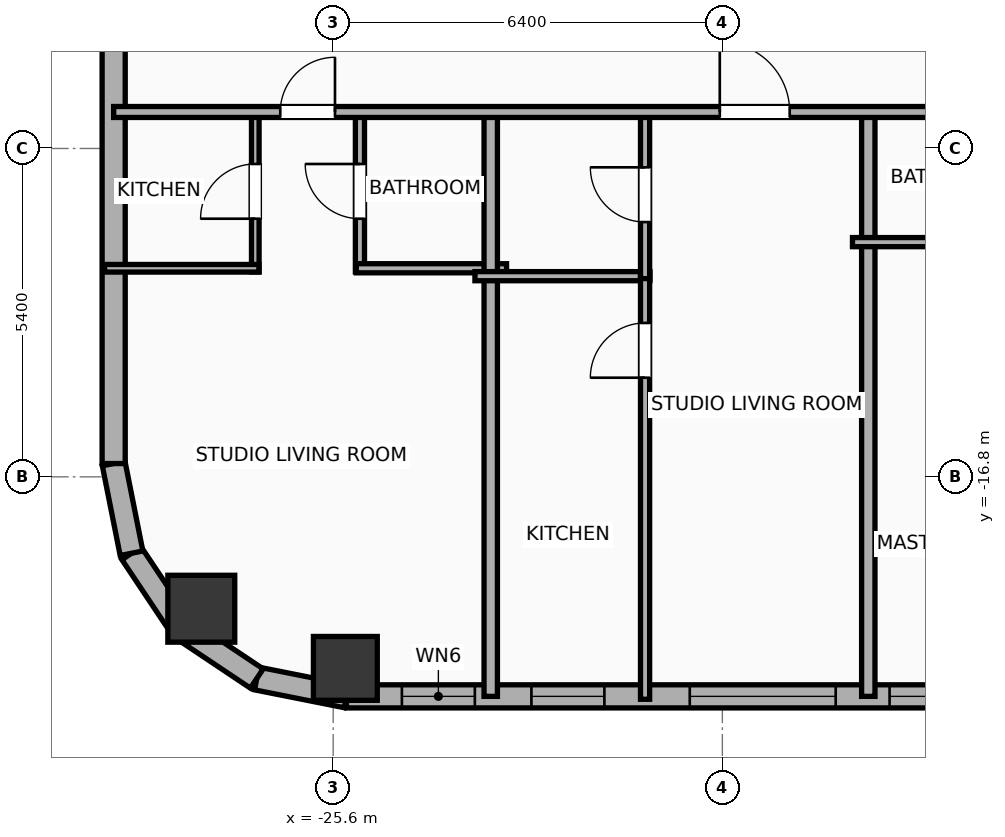
"""IFC4 building model, lengths in metres.
Left out: names, types, materials, properties, quantities, classifications, styles, units other than length and angle.
Written with IfcOpenShell. Run it as: python <this file> out.ifc"""

import sys

from ifc_helpers import new_model, si_unit, direction, frame, frame_2d, origin, origin_2d, place, context, subcontext, project, spatial, rectangle, hollow_rectangle, hollow_circle, extrude, element, fill, save


model = new_model("IFC4")
c1 = context("Model", 3, precision=1e-05, world=origin(), true_north=direction((0.0, 1.0)))
c2 = subcontext(c1, "Body", "Model", "MODEL_VIEW")
j1 = project(units=[si_unit("LENGTHUNIT", "METRE"), si_unit("PLANEANGLEUNIT", "RADIAN")], contexts=[c1])
p1 = place(None, origin())
s1 = spatial("IfcSite", under=j1, at=p1, CompositionType="ELEMENT")
p2 = place(p1, origin())
s2 = spatial("IfcBuilding", under=s1, at=p2, CompositionType="ELEMENT")
p3 = place(p2, frame((0.0, 0.0, 109.2)))
s3 = spatial("IfcBuildingStorey", under=s2, at=p3, CompositionType="ELEMENT", Elevation=109.2)
p4 = place(p3, frame((-25.4, -19.95, 0.0), z_axis=(0.0, 0.0, 1.0), x_axis=(1.0, 0.0, 0.0)))
e1 = element("IfcColumn", 1, at=p4, inside=s3, PredefinedType="COLUMN", context=c2, shape_type="SweptSolid", body=[
    extrude(hollow_rectangle(XDim=1.05, YDim=1.05, WallThickness=0.036, at=origin_2d()), origin(), (0.0, 0.0, 1.0), 3.9),
])
p5 = place(p3, frame((-27.769, -18.969, 0.0), z_axis=(0.0, 0.0, 1.0), x_axis=(1.0, 0.0, 0.0)))
e2 = element("IfcColumn", 2, at=p5, inside=s3, PredefinedType="COLUMN", context=c2, shape_type="SweptSolid", body=[
    extrude(hollow_circle(Radius=0.55, WallThickness=0.036, at=origin_2d()), origin(), (0.0, 0.0, 1.0), 3.9),
])
p6 = place(p3, frame((29.381, -20.41, 0.0), z_axis=(0.0, 0.0, 1.0), x_axis=(-1.0, 0.0, 0.0)))
e3 = element("IfcWall", 3, at=p6, inside=s3, PredefinedType="ELEMENTEDWALL", context=c2, shape_type="SweptSolid", body=[
    extrude(rectangle(XDim=54.763, YDim=0.38, at=frame_2d((27.381, 0.0))), origin(), (0.0, 0.0, 1.0), 3.65),
])
p7 = place(p6, frame((3.995, 0.0, 0.75)))
e4 = element("IfcOpeningElement", 4, at=p7, cuts=e3, PredefinedType="OPENING", context=c2, shape_type="SweptSolid", body=[
    extrude(rectangle(XDim=2.4, YDim=2.1, at=frame_2d((1.2, 1.05))), frame((0.0, 0.2, 0.0), z_axis=(0.0, -1.0, 0.0), x_axis=(1.0, 0.0, 0.0)), (0.0, 0.0, 1.0), 0.4),
])
p8 = place(p6, frame((18.486, 0.0, 0.75)))
e5 = element("IfcOpeningElement", 5, at=p8, cuts=e3, PredefinedType="OPENING", context=c2, shape_type="SweptSolid", body=[
    extrude(rectangle(XDim=2.4, YDim=2.1, at=frame_2d((1.2, 1.05))), frame((0.0, 0.2, 0.0), z_axis=(0.0, -1.0, 0.0), x_axis=(1.0, 0.0, 0.0)), (0.0, 0.0, 1.0), 0.4),
])
p9 = place(p6, frame((46.717, 0.0, 0.75)))
e6 = element("IfcOpeningElement", 6, at=p9, cuts=e3, PredefinedType="OPENING", context=c2, shape_type="SweptSolid", body=[
    extrude(rectangle(XDim=2.4, YDim=2.1, at=frame_2d((1.2, 1.05))), frame((0.0, 0.2, 0.0), z_axis=(0.0, -1.0, 0.0), x_axis=(1.0, 0.0, 0.0)), (0.0, 0.0, 1.0), 0.4),
])
p10 = place(p6, frame((52.651, 0.0, 0.75)))
e7 = element("IfcOpeningElement", 7, at=p10, cuts=e3, PredefinedType="OPENING", context=c2, shape_type="SweptSolid", body=[
    extrude(rectangle(XDim=1.2, YDim=2.05, at=frame_2d((0.6, 1.025))), frame((0.0, 0.2, 0.0), z_axis=(0.0, -1.0, 0.0), x_axis=(1.0, 0.0, 0.0)), (0.0, 0.0, 1.0), 0.4),
])
p11 = place(p6, frame((50.521, 0.0, 0.75)))
e8 = element("IfcOpeningElement", 8, at=p11, cuts=e3, PredefinedType="OPENING", context=c2, shape_type="SweptSolid", body=[
    extrude(rectangle(XDim=1.2, YDim=2.05, at=frame_2d((0.6, 1.025))), frame((0.0, 0.2, 0.0), z_axis=(0.0, -1.0, 0.0), x_axis=(1.0, 0.0, 0.0)), (0.0, 0.0, 1.0), 0.4),
])
p12 = place(p6, frame((40.191, 0.0, 0.75)))
e9 = element("IfcOpeningElement", 9, at=p12, cuts=e3, PredefinedType="OPENING", context=c2, shape_type="SweptSolid", body=[
    extrude(rectangle(XDim=1.2, YDim=2.05, at=frame_2d((0.6, 1.025))), frame((0.0, 0.2, 0.0), z_axis=(0.0, -1.0, 0.0), x_axis=(1.0, 0.0, 0.0)), (0.0, 0.0, 1.0), 0.4),
])
p13 = place(p6, frame((44.631, 0.0, 0.75)))
e10 = element("IfcOpeningElement", 10, at=p13, cuts=e3, PredefinedType="OPENING", context=c2, shape_type="SweptSolid", body=[
    extrude(rectangle(XDim=1.2, YDim=2.05, at=frame_2d((0.6, 1.025))), frame((0.0, 0.2, 0.0), z_axis=(0.0, -1.0, 0.0), x_axis=(1.0, 0.0, 0.0)), (0.0, 0.0, 1.0), 0.4),
])
p14 = place(p6, frame((36.561, 0.0, 0.75)))
e11 = element("IfcOpeningElement", 11, at=p14, cuts=e3, PredefinedType="OPENING", context=c2, shape_type="SweptSolid", body=[
    extrude(rectangle(XDim=1.2, YDim=2.05, at=frame_2d((0.6, 1.025))), frame((0.0, 0.2, 0.0), z_axis=(0.0, -1.0, 0.0), x_axis=(1.0, 0.0, 0.0)), (0.0, 0.0, 1.0), 0.4),
])
p15 = place(p6, frame((30.004, 0.0, 0.75)))
e12 = element("IfcOpeningElement", 12, at=p15, cuts=e3, PredefinedType="OPENING", context=c2, shape_type="SweptSolid", body=[
    extrude(rectangle(XDim=1.2, YDim=2.05, at=frame_2d((0.6, 1.025))), frame((0.0, 0.2, 0.0), z_axis=(0.0, -1.0, 0.0), x_axis=(1.0, 0.0, 0.0)), (0.0, 0.0, 1.0), 0.4),
])
p16 = place(p6, frame((33.599, 0.0, 0.75)))
e13 = element("IfcOpeningElement", 13, at=p16, cuts=e3, PredefinedType="OPENING", context=c2, shape_type="SweptSolid", body=[
    extrude(rectangle(XDim=1.2, YDim=2.05, at=frame_2d((0.6, 1.025))), frame((0.0, 0.2, 0.0), z_axis=(0.0, -1.0, 0.0), x_axis=(1.0, 0.0, 0.0)), (0.0, 0.0, 1.0), 0.4),
])
p17 = place(p6, frame((26.086, 0.0, 0.75)))
e14 = element("IfcOpeningElement", 14, at=p17, cuts=e3, PredefinedType="OPENING", context=c2, shape_type="SweptSolid", body=[
    extrude(rectangle(XDim=1.2, YDim=2.05, at=frame_2d((0.6, 1.025))), frame((0.0, 0.2, 0.0), z_axis=(0.0, -1.0, 0.0), x_axis=(1.0, 0.0, 0.0)), (0.0, 0.0, 1.0), 0.4),
])
p18 = place(p6, frame((22.626, 0.0, 0.75)))
e15 = element("IfcOpeningElement", 15, at=p18, cuts=e3, PredefinedType="OPENING", context=c2, shape_type="SweptSolid", body=[
    extrude(rectangle(XDim=1.2, YDim=2.05, at=frame_2d((0.6, 1.025))), frame((0.0, 0.2, 0.0), z_axis=(0.0, -1.0, 0.0), x_axis=(1.0, 0.0, 0.0)), (0.0, 0.0, 1.0), 0.4),
])
p19 = place(p6, frame((15.361, 0.0, 0.75)))
e16 = element("IfcOpeningElement", 16, at=p19, cuts=e3, PredefinedType="OPENING", context=c2, shape_type="SweptSolid", body=[
    extrude(rectangle(XDim=1.2, YDim=2.05, at=frame_2d((0.6, 1.025))), frame((0.0, 0.2, 0.0), z_axis=(0.0, -1.0, 0.0), x_axis=(1.0, 0.0, 0.0)), (0.0, 0.0, 1.0), 0.4),
])
p20 = place(p6, frame((8.986, 0.0, 0.75)))
e17 = element("IfcOpeningElement", 17, at=p20, cuts=e3, PredefinedType="OPENING", context=c2, shape_type="SweptSolid", body=[
    extrude(rectangle(XDim=1.2, YDim=2.05, at=frame_2d((0.6, 1.025))), frame((0.0, 0.2, 0.0), z_axis=(0.0, -1.0, 0.0), x_axis=(1.0, 0.0, 0.0)), (0.0, 0.0, 1.0), 0.4),
])
p21 = place(p6, frame((1.736, 0.0, 0.75)))
e18 = element("IfcOpeningElement", 18, at=p21, cuts=e3, PredefinedType="OPENING", context=c2, shape_type="SweptSolid", body=[
    extrude(rectangle(XDim=1.2, YDim=2.05, at=frame_2d((0.6, 1.025))), frame((0.0, 0.2, 0.0), z_axis=(0.0, -1.0, 0.0), x_axis=(1.0, 0.0, 0.0)), (0.0, 0.0, 1.0), 0.4),
])
p22 = place(p3, frame((-25.381, -20.41, 0.0), z_axis=(0.0, 0.0, 1.0), x_axis=(-0.980786132421, 0.195086038585, 0.0)))
e19 = element("IfcWall", 19, at=p22, inside=s3, PredefinedType="ELEMENTEDWALL", context=c2, shape_type="SweptSolid", body=[
    extrude(rectangle(XDim=1.504, YDim=0.38, at=frame_2d((0.752, 0.0))), origin(), (0.0, 0.0, 1.0), 3.65),
])
p23 = place(p3, frame((-26.857, -20.116, 0.0), z_axis=(0.0, 0.0, 1.0), x_axis=(-0.831468045563, 0.555572577804, 0.0)))
e20 = element("IfcWall", 20, at=p23, inside=s3, PredefinedType="ELEMENTEDWALL", context=c2, shape_type="SweptSolid", body=[
    extrude(rectangle(XDim=1.485, YDim=0.38, at=frame_2d((0.742, 0.0))), origin(), (0.0, 0.0, 1.0), 3.65),
])
p24 = place(p3, frame((-28.091, -19.292, 0.0), z_axis=(0.0, 0.0, 1.0), x_axis=(-0.555610286119, 0.831442848281, 0.0)))
e21 = element("IfcWall", 21, at=p24, inside=s3, PredefinedType="ELEMENTEDWALL", context=c2, shape_type="SweptSolid", body=[
    extrude(rectangle(XDim=1.485, YDim=0.38, at=frame_2d((0.743, 0.0))), origin(), (0.0, 0.0, 1.0), 3.65),
])
p25 = place(p3, frame((-28.917, -18.057, 0.0), z_axis=(0.0, 0.0, 1.0), x_axis=(-0.195086038585, 0.980786132421, 0.0)))
e22 = element("IfcWall", 22, at=p25, inside=s3, PredefinedType="ELEMENTEDWALL", context=c2, shape_type="SweptSolid", body=[
    extrude(rectangle(XDim=1.504, YDim=0.38, at=frame_2d((0.752, 0.0))), origin(), (0.0, 0.0, 1.0), 3.65),
])
p26 = place(p3, frame((-29.21, -16.581, 0.0), z_axis=(0.0, 0.0, 1.0), x_axis=(0.0, 1.0, 0.0)))
e23 = element("IfcWall", 23, at=p26, inside=s3, PredefinedType="ELEMENTEDWALL", context=c2, shape_type="SweptSolid", body=[
    extrude(rectangle(XDim=34.363, YDim=0.38, at=frame_2d((17.181, 0.0))), origin(), (0.0, 0.0, 1.0), 3.65),
])
p27 = place(p26, frame((31.437, 0.0, 0.75)))
e24 = element("IfcOpeningElement", 24, at=p27, cuts=e23, PredefinedType="OPENING", context=c2, shape_type="SweptSolid", body=[
    extrude(rectangle(XDim=1.2, YDim=2.05, at=frame_2d((0.6, 1.025))), frame((0.0, 0.2, 0.0), z_axis=(0.0, -1.0, 0.0), x_axis=(1.0, 0.0, 0.0)), (0.0, 0.0, 1.0), 0.4),
])
p28 = place(p26, frame((20.676, 0.0, 0.75)))
e25 = element("IfcOpeningElement", 25, at=p28, cuts=e23, PredefinedType="OPENING", context=c2, shape_type="SweptSolid", body=[
    extrude(rectangle(XDim=1.2, YDim=2.05, at=frame_2d((0.6, 1.025))), frame((0.0, 0.2, 0.0), z_axis=(0.0, -1.0, 0.0), x_axis=(1.0, 0.0, 0.0)), (0.0, 0.0, 1.0), 0.4),
])
p29 = place(p26, frame((11.426, 0.0, 0.75)))
e26 = element("IfcOpeningElement", 26, at=p29, cuts=e23, PredefinedType="OPENING", context=c2, shape_type="SweptSolid", body=[
    extrude(rectangle(XDim=1.2, YDim=2.05, at=frame_2d((0.6, 1.025))), frame((0.0, 0.2, 0.0), z_axis=(0.0, -1.0, 0.0), x_axis=(1.0, 0.0, 0.0)), (0.0, 0.0, 1.0), 0.4),
])
p30 = place(p3, frame((-26.881, -13.43, 0.0), z_axis=(0.0, 0.0, 1.0), x_axis=(0.0, 1.0, 0.0)))
e27 = element("IfcWall", 27, at=p30, inside=s3, PredefinedType="PARTITIONING", context=c2, shape_type="SweptSolid", body=[
    extrude(rectangle(XDim=2.65, YDim=0.125, at=frame_2d((1.325, 0.0))), origin(), (0.0, 0.0, 1.0), 3.65),
])
p31 = place(p30, frame((0.875, 0.0, 0.0)))
e28 = element("IfcOpeningElement", 28, at=p31, cuts=e27, PredefinedType="OPENING", context=c2, shape_type="SweptSolid", body=[
    extrude(rectangle(XDim=0.9, YDim=2.05, at=frame_2d((0.45, 1.025))), frame((0.0, 0.073, 0.0), z_axis=(0.0, -1.0, 0.0), x_axis=(1.0, 0.0, 0.0)), (0.0, 0.0, 1.0), 0.145),
])
p32 = place(p3, frame((-25.16, -13.43, 0.0), z_axis=(0.0, 0.0, 1.0), x_axis=(0.0, 1.0, 0.0)))
e29 = element("IfcWall", 29, at=p32, inside=s3, PredefinedType="PLUMBINGWALL", context=c2, shape_type="SweptSolid", body=[
    extrude(rectangle(XDim=2.65, YDim=0.15, at=frame_2d((1.325, 0.0))), origin(), (0.0, 0.0, 1.0), 3.65),
])
p33 = place(p32, frame((0.875, 0.0, 0.0)))
e30 = element("IfcOpeningElement", 30, at=p33, cuts=e29, PredefinedType="OPENING", context=c2, shape_type="SweptSolid", body=[
    extrude(rectangle(XDim=0.9, YDim=2.05, at=frame_2d((0.45, 1.025))), frame((0.0, 0.085, 0.0), z_axis=(0.0, -1.0, 0.0), x_axis=(1.0, 0.0, 0.0)), (0.0, 0.0, 1.0), 0.17),
])
p34 = place(p3, frame((-29.36, -13.37, 0.0), z_axis=(0.0, 0.0, 1.0), x_axis=(1.0, 0.0, 0.0)))
e31 = element("IfcWall", 31, at=p34, inside=s3, PredefinedType="PARTITIONING", context=c2, shape_type="SweptSolid", body=[
    extrude(rectangle(XDim=2.539, YDim=0.125, at=frame_2d((1.27, 0.0))), origin(), (0.0, 0.0, 1.0), 3.65),
])
p35 = place(p3, frame((-25.22, -13.37, 0.0), z_axis=(0.0, 0.0, 1.0), x_axis=(1.0, 0.0, 0.0)))
e32 = element("IfcWall", 32, at=p35, inside=s3, PredefinedType="PLUMBINGWALL", context=c2, shape_type="SweptSolid", body=[
    extrude(rectangle(XDim=2.471, YDim=0.15, at=frame_2d((1.235, 0.0))), origin(), (0.0, 0.0, 1.0), 3.65),
])
p36 = place(p3, frame((-23.009, -20.41, 0.0), z_axis=(0.0, 0.0, 1.0), x_axis=(0.0, 1.0, 0.0)))
e33 = element("IfcWall", 33, at=p36, inside=s3, PredefinedType="PARTITIONING", context=c2, shape_type="SweptSolid", body=[
    extrude(rectangle(XDim=9.69, YDim=0.22, at=frame_2d((4.845, 0.0))), origin(), (0.0, 0.0, 1.0), 3.65),
])
p37 = place(p3, frame((-23.269, -13.5, 0.0), z_axis=(0.0, 0.0, 1.0), x_axis=(1.0, 0.0, 0.0)))
e34 = element("IfcWall", 34, at=p37, inside=s3, PredefinedType="PLUMBINGWALL", context=c2, shape_type="SweptSolid", body=[
    extrude(rectangle(XDim=2.878, YDim=0.15, at=frame_2d((1.439, 0.0))), origin(), (0.0, 0.0, 1.0), 3.65),
])
p38 = place(p3, frame((-20.471, -20.458, 0.0), z_axis=(0.0, 0.0, 1.0), x_axis=(0.0, 1.0, 0.0)))
e35 = element("IfcWall", 35, at=p38, inside=s3, PredefinedType="PLUMBINGWALL", context=c2, shape_type="SweptSolid", body=[
    extrude(rectangle(XDim=6.998, YDim=0.15, at=frame_2d((3.499, 0.0))), origin(), (0.0, 0.0, 1.0), 3.65),
])
p39 = place(p38, frame((5.288, 0.0, 0.0)))
e36 = element("IfcOpeningElement", 36, at=p39, cuts=e35, PredefinedType="OPENING", context=c2, shape_type="SweptSolid", body=[
    extrude(rectangle(XDim=0.9, YDim=2.05, at=frame_2d((0.45, 1.025))), frame((0.0, 0.085, 0.0), z_axis=(0.0, -1.0, 0.0), x_axis=(1.0, 0.0, 0.0)), (0.0, 0.0, 1.0), 0.17),
])
p40 = place(p3, frame((-20.471, -13.54, 0.0), z_axis=(0.0, 0.0, 1.0), x_axis=(0.0, 1.0, 0.0)))
e37 = element("IfcWall", 37, at=p40, inside=s3, PredefinedType="PLUMBINGWALL", context=c2, shape_type="SweptSolid", body=[
    extrude(rectangle(XDim=2.76, YDim=0.15, at=frame_2d((1.38, 0.0))), origin(), (0.0, 0.0, 1.0), 3.65),
])
p41 = place(p40, frame((0.93, 0.0, 0.0)))
e38 = element("IfcOpeningElement", 38, at=p41, cuts=e37, PredefinedType="OPENING", context=c2, shape_type="SweptSolid", body=[
    extrude(rectangle(XDim=0.9, YDim=2.05, at=frame_2d((0.45, 1.025))), frame((0.0, 0.085, 0.0), z_axis=(0.0, -1.0, 0.0), x_axis=(1.0, 0.0, 0.0)), (0.0, 0.0, 1.0), 0.17),
])
p42 = place(p3, frame((-16.8, -20.41, 0.0), z_axis=(0.0, 0.0, 1.0), x_axis=(0.0, 1.0, 0.0)))
e39 = element("IfcWall", 39, at=p42, inside=s3, PredefinedType="PARTITIONING", context=c2, shape_type="SweptSolid", body=[
    extrude(rectangle(XDim=9.69, YDim=0.22, at=frame_2d((4.845, 0.0))), origin(), (0.0, 0.0, 1.0), 3.65),
])
p43 = place(p3, frame((-17.06, -12.94, 0.0), z_axis=(0.0, 0.0, 1.0), x_axis=(1.0, 0.0, 0.0)))
e40 = element("IfcWall", 40, at=p43, inside=s3, PredefinedType="PLUMBINGWALL", context=c2, shape_type="SweptSolid", body=[
    extrude(rectangle(XDim=3.68, YDim=0.15, at=frame_2d((1.84, 0.0))), origin(), (0.0, 0.0, 1.0), 3.65),
])
p44 = place(p3, frame((-29.21, -10.8, 0.0), z_axis=(0.0, 0.0, 1.0), x_axis=(1.0, 0.0, 0.0)))
e41 = element("IfcWall", 41, at=p44, inside=s3, PredefinedType="PARTITIONING", context=c2, shape_type="SweptSolid", body=[
    extrude(rectangle(XDim=62.42, YDim=0.18, at=frame_2d((31.21, 0.0))), origin(), (0.0, 0.0, 1.0), 3.65),
])
p45 = place(p44, frame((2.74, 0.0, 0.0)))
e42 = element("IfcOpeningElement", 42, at=p45, cuts=e41, PredefinedType="OPENING", context=c2, shape_type="SweptSolid", body=[
    extrude(rectangle(XDim=0.9, YDim=2.05, at=frame_2d((0.45, 1.025))), frame((0.0, 0.1, 0.0), z_axis=(0.0, -1.0, 0.0), x_axis=(1.0, 0.0, 0.0)), (0.0, 0.0, 1.0), 0.2),
])
p46 = place(p44, frame((9.968, 0.0, 0.0)))
e43 = element("IfcOpeningElement", 43, at=p46, cuts=e41, PredefinedType="OPENING", context=c2, shape_type="SweptSolid", body=[
    extrude(rectangle(XDim=1.15, YDim=2.05, at=frame_2d((0.575, 1.025))), frame((0.0, 0.1, 0.0), z_axis=(0.0, -1.0, 0.0), x_axis=(1.0, 0.0, 0.0)), (0.0, 0.0, 1.0), 0.2),
])
p47 = place(p44, frame((17.227, 0.0, 0.0)))
e44 = element("IfcOpeningElement", 44, at=p47, cuts=e41, PredefinedType="OPENING", context=c2, shape_type="SweptSolid", body=[
    extrude(rectangle(XDim=1.15, YDim=2.05, at=frame_2d((0.575, 1.025))), frame((0.0, 0.1, 0.0), z_axis=(0.0, -1.0, 0.0), x_axis=(1.0, 0.0, 0.0)), (0.0, 0.0, 1.0), 0.2),
])
p48 = place(p44, frame((28.157, 0.0, 0.0)))
e45 = element("IfcOpeningElement", 45, at=p48, cuts=e41, PredefinedType="OPENING", context=c2, shape_type="SweptSolid", body=[
    extrude(rectangle(XDim=1.15, YDim=2.05, at=frame_2d((0.575, 1.025))), frame((0.0, 0.1, 0.0), z_axis=(0.0, -1.0, 0.0), x_axis=(1.0, 0.0, 0.0)), (0.0, 0.0, 1.0), 0.2),
])
p49 = place(p44, frame((38.512, 0.0, 0.0)))
e46 = element("IfcOpeningElement", 46, at=p49, cuts=e41, PredefinedType="OPENING", context=c2, shape_type="SweptSolid", body=[
    extrude(rectangle(XDim=1.15, YDim=2.05, at=frame_2d((0.575, 1.025))), frame((0.0, 0.1, 0.0), z_axis=(0.0, -1.0, 0.0), x_axis=(1.0, 0.0, 0.0)), (0.0, 0.0, 1.0), 0.2),
])
p50 = place(p44, frame((49.33, 0.0, 0.0)))
e47 = element("IfcOpeningElement", 47, at=p50, cuts=e41, PredefinedType="OPENING", context=c2, shape_type="SweptSolid", body=[
    extrude(rectangle(XDim=1.15, YDim=2.05, at=frame_2d((0.575, 1.025))), frame((0.0, 0.1, 0.0), z_axis=(0.0, -1.0, 0.0), x_axis=(1.0, 0.0, 0.0)), (0.0, 0.0, 1.0), 0.2),
])
p51 = place(p44, frame((58.237, 0.0, 0.0)))
e48 = element("IfcOpeningElement", 48, at=p51, cuts=e41, PredefinedType="OPENING", context=c2, shape_type="SweptSolid", body=[
    extrude(rectangle(XDim=1.15, YDim=2.05, at=frame_2d((0.575, 1.025))), frame((0.0, 0.1, 0.0), z_axis=(0.0, -1.0, 0.0), x_axis=(1.0, 0.0, 0.0)), (0.0, 0.0, 1.0), 0.2),
])
p52 = place(p9, origin())
e49 = element("IfcWindow", 49, at=p52, inside=s3, PartitioningType="SINGLE_PANEL", PredefinedType="WINDOW", context=c2, shape_type="SweptSolid", body=[
    extrude(rectangle(XDim=2.4, YDim=2.1, at=frame_2d((1.2, 1.05))), frame((0.0, 0.03, 0.0), z_axis=(0.0, -1.0, 0.0), x_axis=(1.0, 0.0, 0.0)), (0.0, 0.0, 1.0), 0.06),
])
fill(e6, e49)
p53 = place(p10, origin())
e50 = element("IfcWindow", 50, at=p53, inside=s3, PartitioningType="SINGLE_PANEL", PredefinedType="WINDOW", context=c2, shape_type="SweptSolid", body=[
    extrude(rectangle(XDim=1.2, YDim=2.05, at=frame_2d((0.6, 1.025))), frame((0.0, 0.03, 0.0), z_axis=(0.0, -1.0, 0.0), x_axis=(1.0, 0.0, 0.0)), (0.0, 0.0, 1.0), 0.06),
])
fill(e7, e50)
p54 = place(p11, origin())
e51 = element("IfcWindow", 51, at=p54, inside=s3, PartitioningType="SINGLE_PANEL", PredefinedType="WINDOW", context=c2, shape_type="SweptSolid", body=[
    extrude(rectangle(XDim=1.2, YDim=2.05, at=frame_2d((0.6, 1.025))), frame((0.0, 0.03, 0.0), z_axis=(0.0, -1.0, 0.0), x_axis=(1.0, 0.0, 0.0)), (0.0, 0.0, 1.0), 0.06),
])
fill(e8, e51)
p55 = place(p13, origin())
e52 = element("IfcWindow", 52, at=p55, inside=s3, PartitioningType="SINGLE_PANEL", PredefinedType="WINDOW", context=c2, shape_type="SweptSolid", body=[
    extrude(rectangle(XDim=1.2, YDim=2.05, at=frame_2d((0.6, 1.025))), frame((0.0, 0.03, 0.0), z_axis=(0.0, -1.0, 0.0), x_axis=(1.0, 0.0, 0.0)), (0.0, 0.0, 1.0), 0.06),
])
fill(e10, e52)
p56 = place(p31, origin())
e53 = element("IfcDoor", 53, at=p56, inside=s3, OperationType="SINGLE_SWING_LEFT", PredefinedType="DOOR", context=c2, shape_type="SweptSolid", body=[
    extrude(rectangle(XDim=0.9, YDim=2.05, at=frame_2d((0.45, 1.025))), frame((0.0, 0.025, 0.0), z_axis=(0.0, -1.0, 0.0), x_axis=(1.0, 0.0, 0.0)), (0.0, 0.0, 1.0), 0.05),
])
fill(e28, e53)
p57 = place(p33, origin())
e54 = element("IfcDoor", 54, at=p57, inside=s3, OperationType="SINGLE_SWING_RIGHT", PredefinedType="DOOR", context=c2, shape_type="SweptSolid", body=[
    extrude(rectangle(XDim=0.9, YDim=2.05, at=frame_2d((0.45, 1.025))), frame((0.0, 0.025, 0.0), z_axis=(0.0, -1.0, 0.0), x_axis=(1.0, 0.0, 0.0)), (0.0, 0.0, 1.0), 0.05),
])
fill(e30, e54)
p58 = place(p39, origin())
e55 = element("IfcDoor", 55, at=p58, inside=s3, OperationType="SINGLE_SWING_LEFT", PredefinedType="DOOR", context=c2, shape_type="SweptSolid", body=[
    extrude(rectangle(XDim=0.9, YDim=2.05, at=frame_2d((0.45, 1.025))), frame((0.0, 0.025, 0.0), z_axis=(0.0, -1.0, 0.0), x_axis=(1.0, 0.0, 0.0)), (0.0, 0.0, 1.0), 0.05),
])
fill(e36, e55)
p59 = place(p41, origin())
e56 = element("IfcDoor", 56, at=p59, inside=s3, OperationType="SINGLE_SWING_RIGHT", PredefinedType="DOOR", context=c2, shape_type="SweptSolid", body=[
    extrude(rectangle(XDim=0.9, YDim=2.05, at=frame_2d((0.45, 1.025))), frame((0.0, 0.025, 0.0), z_axis=(0.0, -1.0, 0.0), x_axis=(1.0, 0.0, 0.0)), (0.0, 0.0, 1.0), 0.05),
])
fill(e38, e56)
p60 = place(p45, origin())
e57 = element("IfcDoor", 57, at=p60, inside=s3, OperationType="SINGLE_SWING_RIGHT", PredefinedType="DOOR", context=c2, shape_type="SweptSolid", body=[
    extrude(rectangle(XDim=0.9, YDim=2.05, at=frame_2d((0.45, 1.025))), frame((0.0, 0.025, 0.0), z_axis=(0.0, -1.0, 0.0), x_axis=(1.0, 0.0, 0.0)), (0.0, 0.0, 1.0), 0.05),
])
fill(e42, e57)
p61 = place(p46, origin())
e58 = element("IfcDoor", 58, at=p61, inside=s3, OperationType="SINGLE_SWING_LEFT", PredefinedType="DOOR", context=c2, shape_type="SweptSolid", body=[
    extrude(rectangle(XDim=1.15, YDim=2.05, at=frame_2d((0.575, 1.025))), frame((0.0, 0.025, 0.0), z_axis=(0.0, -1.0, 0.0), x_axis=(1.0, 0.0, 0.0)), (0.0, 0.0, 1.0), 0.05),
])
fill(e43, e58)
save(model, sys.argv[1])
